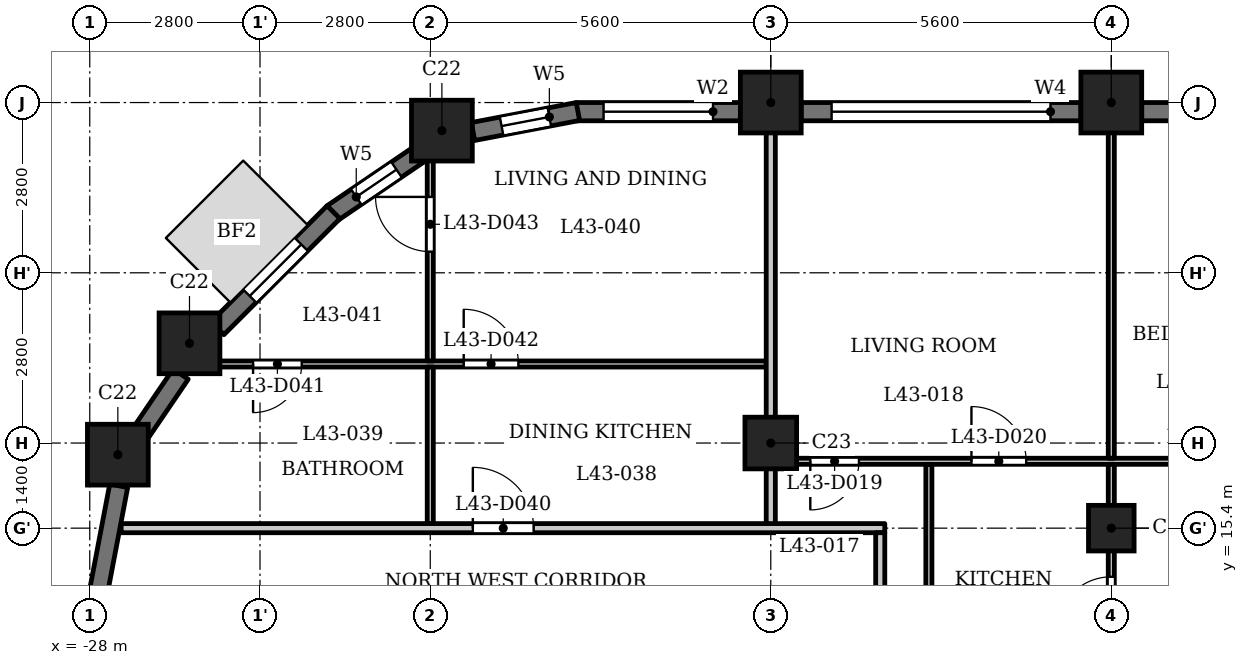
"""IFC4 building model, lengths in metres.
Left out: names, types, materials, properties, quantities, classifications, styles, units other than length and angle.
Written with IfcOpenShell. Run it as: python <this file> out.ifc"""

import sys

from ifc_helpers import new_model, si_unit, direction, frame, frame_2d, origin, origin_2d, place, context, subcontext, project, spatial, rectangle, extrude, element, fill, save


model = new_model("IFC4")
c1 = context("Model", 3, precision=1e-05, world=origin(), true_north=direction((0.0, 1.0)))
c2 = subcontext(c1, "Body", "Model", "MODEL_VIEW")
j1 = project(units=[si_unit("LENGTHUNIT", "METRE"), si_unit("PLANEANGLEUNIT", "RADIAN")], contexts=[c1])
p1 = place(None, origin())
s1 = spatial("IfcSite", under=j1, at=p1, CompositionType="ELEMENT")
p2 = place(p1, origin())
s2 = spatial("IfcBuilding", under=s1, at=p2, CompositionType="ELEMENT")
p3 = place(p2, frame((0.0, 0.0, 167.6)))
s3 = spatial("IfcBuildingStorey", under=s2, at=p3, CompositionType="ELEMENT", Elevation=167.6)
for number, where, z_axis, x_axis in (
    (1, (-11.2, 22.4, 0.0), (0.0, 0.0, 1.0), (1.0, 0.0, 0.0)),
    (2, (-16.8, 22.4, 0.0), (0.0, 0.0, 1.0), (1.0, 0.0, 0.0)),
    (3, (-22.209, 21.938, 0.0), (0.0, 0.0, 1.0), (1.0, 0.0, 0.0)),
    (4, (-26.36, 18.44, 0.0), (0.0, 0.0, 1.0), (1.0, 0.0, 0.0)),
    (5, (-27.538, 16.609, 0.0), (0.0, 0.0, 1.0), (1.0, 0.0, 0.0)),
):
    element("IfcColumn", number, at=place(p3, frame(where, z_axis=z_axis, x_axis=x_axis)), inside=s3, PredefinedType="COLUMN", context=c2, shape_type="SweptSolid", body=[
        extrude(rectangle(XDim=1.0, YDim=1.0, at=origin_2d()), origin(), (0.0, 0.0, 1.0), 3.5),
    ])
p4 = place(p3, frame((-16.8, 16.8, 0.0), z_axis=(0.0, 0.0, 1.0), x_axis=(1.0, 0.0, 0.0)))
e6 = element("IfcColumn", 6, at=p4, inside=s3, PredefinedType="COLUMN", context=c2, shape_type="SweptSolid", body=[
    extrude(rectangle(XDim=0.85, YDim=0.85, at=origin_2d()), origin(), (0.0, 0.0, 1.0), 3.5),
])
p5 = place(p3, frame((-11.2, 15.4, 0.0), z_axis=(0.0, 0.0, 1.0), x_axis=(1.0, 0.0, 0.0)))
e7 = element("IfcColumn", 7, at=p5, inside=s3, PredefinedType="COLUMN", context=c2, shape_type="SweptSolid", body=[
    extrude(rectangle(XDim=0.75, YDim=0.75, at=origin_2d()), origin(), (0.0, 0.0, 1.0), 3.5),
])
p6 = place(p3, frame((-6.1, 22.25, 0.0), z_axis=(0.0, 0.0, 1.0), x_axis=(-1.0, 0.0, 0.0)))
e8 = element("IfcWall", 8, at=p6, inside=s3, PredefinedType="SOLIDWALL", context=c2, shape_type="SweptSolid", body=[
    extrude(rectangle(XDim=4.6, YDim=0.3, at=frame_2d((2.3, 0.0))), origin(), (0.0, 0.0, 1.0), 2.45),
])
p7 = place(p6, frame((0.512, 0.0, 0.6)))
e9 = element("IfcOpeningElement", 9, at=p7, cuts=e8, PredefinedType="OPENING", context=c2, shape_type="SweptSolid", body=[
    extrude(rectangle(XDim=1.2, YDim=1.55, at=frame_2d((0.6, 0.775))), frame((0.0, 0.16, 0.0), z_axis=(0.0, -1.0, 0.0), x_axis=(1.0, 0.0, 0.0)), (0.0, 0.0, 1.0), 0.32),
])
p8 = place(p6, frame((2.887, 0.0, 0.6)))
e10 = element("IfcOpeningElement", 10, at=p8, cuts=e8, PredefinedType="OPENING", context=c2, shape_type="SweptSolid", body=[
    extrude(rectangle(XDim=1.2, YDim=1.55, at=frame_2d((0.6, 0.775))), frame((0.0, 0.16, 0.0), z_axis=(0.0, -1.0, 0.0), x_axis=(1.0, 0.0, 0.0)), (0.0, 0.0, 1.0), 0.32),
])
p9 = place(p3, frame((-11.7, 22.25, 0.0), z_axis=(0.0, 0.0, 1.0), x_axis=(-1.0, 0.0, 0.0)))
e11 = element("IfcWall", 11, at=p9, inside=s3, PredefinedType="SOLIDWALL", context=c2, shape_type="SweptSolid", body=[
    extrude(rectangle(XDim=4.6, YDim=0.3, at=frame_2d((2.3, 0.0))), origin(), (0.0, 0.0, 1.0), 2.45),
])
p10 = place(p9, frame((0.5, 0.0, 1.2)))
e12 = element("IfcOpeningElement", 12, at=p10, cuts=e11, PredefinedType="OPENING", context=c2, shape_type="SweptSolid", body=[
    extrude(rectangle(XDim=3.6, YDim=0.95, at=frame_2d((1.8, 0.475))), frame((0.0, 0.16, 0.0), z_axis=(0.0, -1.0, 0.0), x_axis=(1.0, 0.0, 0.0)), (0.0, 0.0, 1.0), 0.32),
])
p11 = place(p3, frame((-17.3, 22.25, 0.0), z_axis=(0.0, 0.0, 1.0), x_axis=(-1.0, 0.0, 0.0)))
e13 = element("IfcWall", 13, at=p11, inside=s3, PredefinedType="SOLIDWALL", context=c2, shape_type="SweptSolid", body=[
    extrude(rectangle(XDim=2.7, YDim=0.3, at=frame_2d((1.35, 0.0))), origin(), (0.0, 0.0, 1.0), 2.45),
])
p12 = place(p11, frame((0.45, 0.0, 0.9)))
e14 = element("IfcOpeningElement", 14, at=p12, cuts=e13, PredefinedType="OPENING", context=c2, shape_type="SweptSolid", body=[
    extrude(rectangle(XDim=1.8, YDim=1.25, at=frame_2d((0.9, 0.625))), frame((0.0, 0.16, 0.0), z_axis=(0.0, -1.0, 0.0), x_axis=(1.0, 0.0, 0.0)), (0.0, 0.0, 1.0), 0.32),
])
p13 = place(p3, frame((-19.972, 22.253, 0.0), z_axis=(0.0, 0.0, 1.0), x_axis=(-0.982284988433, -0.187393173565, 0.0)))
e15 = element("IfcWall", 15, at=p13, inside=s3, PredefinedType="SOLIDWALL", context=c2, shape_type="SweptSolid", body=[
    extrude(rectangle(XDim=1.756, YDim=0.3, at=frame_2d((0.878, 0.0))), origin(), (0.0, 0.0, 1.0), 2.45),
])
p14 = place(p13, frame((0.478, 0.0, 0.6)))
e16 = element("IfcOpeningElement", 16, at=p14, cuts=e15, PredefinedType="OPENING", context=c2, shape_type="SweptSolid", body=[
    extrude(rectangle(XDim=0.8, YDim=1.55, at=frame_2d((0.4, 0.775))), frame((0.0, 0.16, 0.0), z_axis=(0.0, -1.0, 0.0), x_axis=(1.0, 0.0, 0.0)), (0.0, 0.0, 1.0), 0.32),
])
p15 = place(p3, frame((-22.56, 21.566, 0.0), z_axis=(0.0, 0.0, 1.0), x_axis=(-0.82707645233, -0.562089443061, 0.0)))
e17 = element("IfcWall", 17, at=p15, inside=s3, PredefinedType="SOLIDWALL", context=c2, shape_type="SweptSolid", body=[
    extrude(rectangle(XDim=1.756, YDim=0.3, at=frame_2d((0.878, 0.0))), origin(), (0.0, 0.0, 1.0), 2.45),
])
p16 = place(p15, frame((0.478, 0.0, 0.6)))
e18 = element("IfcOpeningElement", 18, at=p16, cuts=e17, PredefinedType="OPENING", context=c2, shape_type="SweptSolid", body=[
    extrude(rectangle(XDim=0.8, YDim=1.55, at=frame_2d((0.4, 0.775))), frame((0.0, 0.16, 0.0), z_axis=(0.0, -1.0, 0.0), x_axis=(1.0, 0.0, 0.0)), (0.0, 0.0, 1.0), 0.32),
])
p17 = place(p3, frame((-23.991, 20.597, 0.0), z_axis=(0.0, 0.0, 1.0), x_axis=(-0.707106781187, -0.707106781187, 0.0)))
e19 = element("IfcWall", 19, at=p17, inside=s3, PredefinedType="SOLIDWALL", context=c2, shape_type="SweptSolid", body=[
    extrude(rectangle(XDim=2.7, YDim=0.3, at=frame_2d((1.35, 0.0))), origin(), (0.0, 0.0, 1.0), 2.45),
])
p18 = place(p17, frame((0.75, 0.0, 0.6)))
e20 = element("IfcOpeningElement", 20, at=p18, cuts=e19, PredefinedType="OPENING", context=c2, shape_type="SweptSolid", body=[
    extrude(rectangle(XDim=1.2, YDim=1.55, at=frame_2d((0.6, 0.775))), frame((0.0, 0.16, 0.0), z_axis=(0.0, -1.0, 0.0), x_axis=(1.0, 0.0, 0.0)), (0.0, 0.0, 1.0), 0.32),
])
p19 = place(p3, frame((-26.504, 17.934, 0.0), z_axis=(0.0, 0.0, 1.0), x_axis=(-0.562145470373, -0.827038372833, 0.0)))
e21 = element("IfcWall", 21, at=p19, inside=s3, PredefinedType="SOLIDWALL", context=c2, shape_type="SweptSolid", body=[
    extrude(rectangle(XDim=1.177, YDim=0.3, at=frame_2d((0.588, 0.0))), origin(), (0.0, 0.0, 1.0), 3.2),
])
p20 = place(p3, frame((-27.524, 16.097, 0.0), z_axis=(0.0, 0.0, 1.0), x_axis=(-0.187259034321, -0.982310569049, 0.0)))
e22 = element("IfcWall", 22, at=p20, inside=s3, PredefinedType="SOLIDWALL", context=c2, shape_type="SweptSolid", body=[
    extrude(rectangle(XDim=1.756, YDim=0.3, at=frame_2d((0.878, 0.0))), origin(), (0.0, 0.0, 1.0), 2.45),
])
p21 = place(p3, frame((-27.484, 15.4, 0.0), z_axis=(0.0, 0.0, 1.0), x_axis=(1.0, 0.0, 0.0)))
e23 = element("IfcWall", 23, at=p21, inside=s3, PredefinedType="PARTITIONING", context=c2, shape_type="SweptSolid", body=[
    extrude(rectangle(XDim=12.559, YDim=0.15, at=frame_2d((6.279, 0.0))), origin(), (0.0, 0.0, 1.0), 3.2),
])
p22 = place(p21, frame((5.784, 0.0, 0.0)))
e24 = element("IfcOpeningElement", 24, at=p22, cuts=e23, PredefinedType="OPENING", context=c2, shape_type="SweptSolid", body=[
    extrude(rectangle(XDim=1.0, YDim=2.1, at=frame_2d((0.5, 1.05))), frame((0.0, 0.085, 0.0), z_axis=(0.0, -1.0, 0.0), x_axis=(1.0, 0.0, 0.0)), (0.0, 0.0, 1.0), 0.17),
])
p23 = place(p3, frame((-16.725, 16.5, 0.0), z_axis=(0.0, 0.0, 1.0), x_axis=(1.0, 0.0, 0.0)))
e25 = element("IfcWall", 25, at=p23, inside=s3, PredefinedType="PARTITIONING", context=c2, shape_type="SweptSolid", body=[
    extrude(rectangle(XDim=33.45, YDim=0.1, at=frame_2d((16.725, 0.0))), origin(), (0.0, 0.0, 1.0), 3.2),
])
p24 = place(p23, frame((0.575, 0.0, 0.0)))
e26 = element("IfcOpeningElement", 26, at=p24, cuts=e25, PredefinedType="OPENING", context=c2, shape_type="SweptSolid", body=[
    extrude(rectangle(XDim=0.8, YDim=2.1, at=frame_2d((0.4, 1.05))), frame((0.0, 0.06, 0.0), z_axis=(0.0, -1.0, 0.0), x_axis=(1.0, 0.0, 0.0)), (0.0, 0.0, 1.0), 0.12),
])
p25 = place(p23, frame((3.225, 0.0, 0.0)))
e27 = element("IfcOpeningElement", 27, at=p25, cuts=e25, PredefinedType="OPENING", context=c2, shape_type="SweptSolid", body=[
    extrude(rectangle(XDim=0.9, YDim=2.1, at=frame_2d((0.45, 1.05))), frame((0.0, 0.06, 0.0), z_axis=(0.0, -1.0, 0.0), x_axis=(1.0, 0.0, 0.0)), (0.0, 0.0, 1.0), 0.12),
])
p26 = place(p23, frame((6.775, 0.0, 0.0)))
e28 = element("IfcOpeningElement", 28, at=p26, cuts=e25, PredefinedType="OPENING", context=c2, shape_type="SweptSolid", body=[
    extrude(rectangle(XDim=0.9, YDim=2.1, at=frame_2d((0.45, 1.05))), frame((0.0, 0.06, 0.0), z_axis=(0.0, -1.0, 0.0), x_axis=(1.0, 0.0, 0.0)), (0.0, 0.0, 1.0), 0.12),
])
p27 = place(p23, frame((8.825, 0.0, 0.0)))
e29 = element("IfcOpeningElement", 29, at=p27, cuts=e25, PredefinedType="OPENING", context=c2, shape_type="SweptSolid", body=[
    extrude(rectangle(XDim=0.9, YDim=2.1, at=frame_2d((0.45, 1.05))), frame((0.0, 0.06, 0.0), z_axis=(0.0, -1.0, 0.0), x_axis=(1.0, 0.0, 0.0)), (0.0, 0.0, 1.0), 0.12),
])
p28 = place(p23, frame((20.775, 0.0, 0.0)))
e30 = element("IfcOpeningElement", 30, at=p28, cuts=e25, PredefinedType="OPENING", context=c2, shape_type="SweptSolid", body=[
    extrude(rectangle(XDim=0.8, YDim=2.1, at=frame_2d((0.4, 1.05))), frame((0.0, 0.06, 0.0), z_axis=(0.0, -1.0, 0.0), x_axis=(1.0, 0.0, 0.0)), (0.0, 0.0, 1.0), 0.12),
])
p29 = place(p23, frame((17.325, 0.0, 0.0)))
e31 = element("IfcOpeningElement", 31, at=p29, cuts=e25, PredefinedType="OPENING", context=c2, shape_type="SweptSolid", body=[
    extrude(rectangle(XDim=0.9, YDim=2.1, at=frame_2d((0.45, 1.05))), frame((0.0, 0.06, 0.0), z_axis=(0.0, -1.0, 0.0), x_axis=(1.0, 0.0, 0.0)), (0.0, 0.0, 1.0), 0.12),
])
p30 = place(p23, frame((12.375, 0.0, 0.0)))
e32 = element("IfcOpeningElement", 32, at=p30, cuts=e25, PredefinedType="OPENING", context=c2, shape_type="SweptSolid", body=[
    extrude(rectangle(XDim=0.9, YDim=2.1, at=frame_2d((0.45, 1.05))), frame((0.0, 0.06, 0.0), z_axis=(0.0, -1.0, 0.0), x_axis=(1.0, 0.0, 0.0)), (0.0, 0.0, 1.0), 0.12),
])
p31 = place(p23, frame((14.425, 0.0, 0.0)))
e33 = element("IfcOpeningElement", 33, at=p31, cuts=e25, PredefinedType="OPENING", context=c2, shape_type="SweptSolid", body=[
    extrude(rectangle(XDim=0.9, YDim=2.1, at=frame_2d((0.45, 1.05))), frame((0.0, 0.06, 0.0), z_axis=(0.0, -1.0, 0.0), x_axis=(1.0, 0.0, 0.0)), (0.0, 0.0, 1.0), 0.12),
])
p32 = place(p23, frame((26.575, 0.0, 0.0)))
e34 = element("IfcOpeningElement", 34, at=p32, cuts=e25, PredefinedType="OPENING", context=c2, shape_type="SweptSolid", body=[
    extrude(rectangle(XDim=0.8, YDim=2.1, at=frame_2d((0.4, 1.05))), frame((0.0, 0.06, 0.0), z_axis=(0.0, -1.0, 0.0), x_axis=(1.0, 0.0, 0.0)), (0.0, 0.0, 1.0), 0.12),
])
p33 = place(p23, frame((23.775, 0.0, 0.0)))
e35 = element("IfcOpeningElement", 35, at=p33, cuts=e25, PredefinedType="OPENING", context=c2, shape_type="SweptSolid", body=[
    extrude(rectangle(XDim=0.9, YDim=2.1, at=frame_2d((0.45, 1.05))), frame((0.0, 0.06, 0.0), z_axis=(0.0, -1.0, 0.0), x_axis=(1.0, 0.0, 0.0)), (0.0, 0.0, 1.0), 0.12),
])
p34 = place(p23, frame((32.075, 0.0, 0.0)))
e36 = element("IfcOpeningElement", 36, at=p34, cuts=e25, PredefinedType="OPENING", context=c2, shape_type="SweptSolid", body=[
    extrude(rectangle(XDim=0.8, YDim=2.1, at=frame_2d((0.4, 1.05))), frame((0.0, 0.06, 0.0), z_axis=(0.0, -1.0, 0.0), x_axis=(1.0, 0.0, 0.0)), (0.0, 0.0, 1.0), 0.12),
])
p35 = place(p23, frame((29.375, 0.0, 0.0)))
e37 = element("IfcOpeningElement", 37, at=p35, cuts=e25, PredefinedType="OPENING", context=c2, shape_type="SweptSolid", body=[
    extrude(rectangle(XDim=0.9, YDim=2.1, at=frame_2d((0.45, 1.05))), frame((0.0, 0.06, 0.0), z_axis=(0.0, -1.0, 0.0), x_axis=(1.0, 0.0, 0.0)), (0.0, 0.0, 1.0), 0.12),
])
p36 = place(p3, frame((-26.44, 18.1, 0.0), z_axis=(0.0, 0.0, 1.0), x_axis=(1.0, 0.0, 0.0)))
e38 = element("IfcWall", 38, at=p36, inside=s3, PredefinedType="PARTITIONING", context=c2, shape_type="SweptSolid", body=[
    extrude(rectangle(XDim=9.565, YDim=0.1, at=frame_2d((4.782, 0.0))), origin(), (0.0, 0.0, 1.0), 3.2),
])
p37 = place(p36, frame((1.126, 0.0, 0.0)))
e39 = element("IfcOpeningElement", 39, at=p37, cuts=e38, PredefinedType="OPENING", context=c2, shape_type="SweptSolid", body=[
    extrude(rectangle(XDim=0.8, YDim=2.1, at=frame_2d((0.4, 1.05))), frame((0.0, 0.06, 0.0), z_axis=(0.0, -1.0, 0.0), x_axis=(1.0, 0.0, 0.0)), (0.0, 0.0, 1.0), 0.12),
])
p38 = place(p36, frame((4.59, 0.0, 0.0)))
e40 = element("IfcOpeningElement", 40, at=p38, cuts=e38, PredefinedType="OPENING", context=c2, shape_type="SweptSolid", body=[
    extrude(rectangle(XDim=0.9, YDim=2.1, at=frame_2d((0.45, 1.05))), frame((0.0, 0.06, 0.0), z_axis=(0.0, -1.0, 0.0), x_axis=(1.0, 0.0, 0.0)), (0.0, 0.0, 1.0), 0.12),
])
p39 = place(p3, frame((-22.4, 15.475, 0.0), z_axis=(0.0, 0.0, 1.0), x_axis=(0.0, 1.0, 0.0)))
e41 = element("IfcWall", 41, at=p39, inside=s3, PredefinedType="PARTITIONING", context=c2, shape_type="SweptSolid", body=[
    extrude(rectangle(XDim=2.575, YDim=0.1, at=frame_2d((1.288, 0.0))), origin(), (0.0, 0.0, 1.0), 3.2),
])
p40 = place(p3, frame((-22.4, 18.15, 0.0), z_axis=(0.0, 0.0, 1.0), x_axis=(0.0, 1.0, 0.0)))
e42 = element("IfcWall", 42, at=p40, inside=s3, PredefinedType="PARTITIONING", context=c2, shape_type="SweptSolid", body=[
    extrude(rectangle(XDim=3.57, YDim=0.1, at=frame_2d((1.785, 0.0))), origin(), (0.0, 0.0, 1.0), 3.2),
])
p41 = place(p40, frame((1.798, 0.0, 0.0)))
e43 = element("IfcOpeningElement", 43, at=p41, cuts=e42, PredefinedType="OPENING", context=c2, shape_type="SweptSolid", body=[
    extrude(rectangle(XDim=0.9, YDim=2.1, at=frame_2d((0.45, 1.05))), frame((0.0, 0.06, 0.0), z_axis=(0.0, -1.0, 0.0), x_axis=(1.0, 0.0, 0.0)), (0.0, 0.0, 1.0), 0.12),
])
p42 = place(p3, frame((-16.8, 15.475, 0.0), z_axis=(0.0, 0.0, 1.0), x_axis=(0.0, 1.0, 0.0)))
e44 = element("IfcWall", 44, at=p42, inside=s3, PredefinedType="PARTITIONING", context=c2, shape_type="SweptSolid", body=[
    extrude(rectangle(XDim=7.405, YDim=0.15, at=frame_2d((3.702, 0.0))), origin(), (0.0, 0.0, 1.0), 3.2),
])
p43 = place(p3, frame((-15.0, 13.275, 0.0), z_axis=(0.0, 0.0, 1.0), x_axis=(0.0, 1.0, 0.0)))
e45 = element("IfcWall", 45, at=p43, inside=s3, PredefinedType="PARTITIONING", context=c2, shape_type="SweptSolid", body=[
    extrude(rectangle(XDim=2.05, YDim=0.15, at=frame_2d((1.025, 0.0))), origin(), (0.0, 0.0, 1.0), 3.2),
])
p44 = place(p3, frame((-14.2, 13.275, 0.0), z_axis=(0.0, 0.0, 1.0), x_axis=(0.0, 1.0, 0.0)))
e46 = element("IfcWall", 46, at=p44, inside=s3, PredefinedType="PARTITIONING", context=c2, shape_type="SweptSolid", body=[
    extrude(rectangle(XDim=3.175, YDim=0.1, at=frame_2d((1.587, 0.0))), origin(), (0.0, 0.0, 1.0), 3.2),
])
p45 = place(p3, frame((-11.2, 13.275, 0.0), z_axis=(0.0, 0.0, 1.0), x_axis=(0.0, 1.0, 0.0)))
e47 = element("IfcWall", 47, at=p45, inside=s3, PredefinedType="PARTITIONING", context=c2, shape_type="SweptSolid", body=[
    extrude(rectangle(XDim=3.175, YDim=0.1, at=frame_2d((1.587, 0.0))), origin(), (0.0, 0.0, 1.0), 3.2),
])
p46 = place(p45, frame((0.425, 0.0, 0.0)))
e48 = element("IfcOpeningElement", 48, at=p46, cuts=e47, PredefinedType="OPENING", context=c2, shape_type="SweptSolid", body=[
    extrude(rectangle(XDim=0.9, YDim=2.1, at=frame_2d((0.45, 1.05))), frame((0.0, 0.06, 0.0), z_axis=(0.0, -1.0, 0.0), x_axis=(1.0, 0.0, 0.0)), (0.0, 0.0, 1.0), 0.12),
])
p47 = place(p3, frame((-11.2, 16.55, 0.0), z_axis=(0.0, 0.0, 1.0), x_axis=(0.0, 1.0, 0.0)))
e49 = element("IfcWall", 49, at=p47, inside=s3, PredefinedType="PARTITIONING", context=c2, shape_type="SweptSolid", body=[
    extrude(rectangle(XDim=6.33, YDim=0.1, at=frame_2d((3.165, 0.0))), origin(), (0.0, 0.0, 1.0), 3.2),
])
p48 = place(p46, origin())
e50 = element("IfcDoor", 50, at=p48, inside=s3, OperationType="SINGLE_SWING_RIGHT", PredefinedType="DOOR", context=c2, shape_type="SweptSolid", body=[
    extrude(rectangle(XDim=0.9, YDim=2.1, at=frame_2d((0.45, 1.05))), frame((0.0, 0.025, 0.0), z_axis=(0.0, -1.0, 0.0), x_axis=(1.0, 0.0, 0.0)), (0.0, 0.0, 1.0), 0.05),
])
fill(e48, e50)
p49 = place(p24, origin())
e51 = element("IfcDoor", 51, at=p49, inside=s3, OperationType="SINGLE_SWING_LEFT", PredefinedType="DOOR", context=c2, shape_type="SweptSolid", body=[
    extrude(rectangle(XDim=0.8, YDim=2.1, at=frame_2d((0.4, 1.05))), frame((0.0, 0.025, 0.0), z_axis=(0.0, -1.0, 0.0), x_axis=(1.0, 0.0, 0.0)), (0.0, 0.0, 1.0), 0.05),
])
fill(e26, e51)
p50 = place(p25, origin())
e52 = element("IfcDoor", 52, at=p50, inside=s3, OperationType="SINGLE_SWING_RIGHT", PredefinedType="DOOR", context=c2, shape_type="SweptSolid", body=[
    extrude(rectangle(XDim=0.9, YDim=2.1, at=frame_2d((0.45, 1.05))), frame((0.0, 0.025, 0.0), z_axis=(0.0, -1.0, 0.0), x_axis=(1.0, 0.0, 0.0)), (0.0, 0.0, 1.0), 0.05),
])
fill(e27, e52)
p51 = place(p22, origin())
e53 = element("IfcDoor", 53, at=p51, inside=s3, OperationType="SINGLE_SWING_RIGHT", PredefinedType="DOOR", context=c2, shape_type="SweptSolid", body=[
    extrude(rectangle(XDim=1.0, YDim=2.1, at=frame_2d((0.5, 1.05))), frame((0.0, 0.025, 0.0), z_axis=(0.0, -1.0, 0.0), x_axis=(1.0, 0.0, 0.0)), (0.0, 0.0, 1.0), 0.05),
])
fill(e24, e53)
p52 = place(p37, origin())
e54 = element("IfcDoor", 54, at=p52, inside=s3, OperationType="SINGLE_SWING_LEFT", PredefinedType="DOOR", context=c2, shape_type="SweptSolid", body=[
    extrude(rectangle(XDim=0.8, YDim=2.1, at=frame_2d((0.4, 1.05))), frame((0.0, 0.025, 0.0), z_axis=(0.0, -1.0, 0.0), x_axis=(1.0, 0.0, 0.0)), (0.0, 0.0, 1.0), 0.05),
])
fill(e39, e54)
p53 = place(p38, origin())
e55 = element("IfcDoor", 55, at=p53, inside=s3, OperationType="SINGLE_SWING_RIGHT", PredefinedType="DOOR", context=c2, shape_type="SweptSolid", body=[
    extrude(rectangle(XDim=0.9, YDim=2.1, at=frame_2d((0.45, 1.05))), frame((0.0, 0.025, 0.0), z_axis=(0.0, -1.0, 0.0), x_axis=(1.0, 0.0, 0.0)), (0.0, 0.0, 1.0), 0.05),
])
fill(e40, e55)
p54 = place(p41, origin())
e56 = element("IfcDoor", 56, at=p54, inside=s3, OperationType="SINGLE_SWING_LEFT", PredefinedType="DOOR", context=c2, shape_type="SweptSolid", body=[
    extrude(rectangle(XDim=0.9, YDim=2.1, at=frame_2d((0.45, 1.05))), frame((0.0, 0.025, 0.0), z_axis=(0.0, -1.0, 0.0), x_axis=(1.0, 0.0, 0.0)), (0.0, 0.0, 1.0), 0.05),
])
fill(e43, e56)
p55 = place(p10, origin())
e57 = element("IfcWindow", 57, at=p55, inside=s3, PartitioningType="SINGLE_PANEL", PredefinedType="WINDOW", context=c2, shape_type="SweptSolid", body=[
    extrude(rectangle(XDim=3.6, YDim=0.95, at=frame_2d((1.8, 0.475))), frame((0.0, 0.03, 0.0), z_axis=(0.0, -1.0, 0.0), x_axis=(1.0, 0.0, 0.0)), (0.0, 0.0, 1.0), 0.06),
])
fill(e12, e57)
p56 = place(p12, origin())
e58 = element("IfcWindow", 58, at=p56, inside=s3, PartitioningType="SINGLE_PANEL", PredefinedType="WINDOW", context=c2, shape_type="SweptSolid", body=[
    extrude(rectangle(XDim=1.8, YDim=1.25, at=frame_2d((0.9, 0.625))), frame((0.0, 0.03, 0.0), z_axis=(0.0, -1.0, 0.0), x_axis=(1.0, 0.0, 0.0)), (0.0, 0.0, 1.0), 0.06),
])
fill(e14, e58)
p57 = place(p14, origin())
e59 = element("IfcWindow", 59, at=p57, inside=s3, PartitioningType="SINGLE_PANEL", PredefinedType="WINDOW", context=c2, shape_type="SweptSolid", body=[
    extrude(rectangle(XDim=0.8, YDim=1.55, at=frame_2d((0.4, 0.775))), frame((0.0, 0.03, 0.0), z_axis=(0.0, -1.0, 0.0), x_axis=(1.0, 0.0, 0.0)), (0.0, 0.0, 1.0), 0.06),
])
fill(e16, e59)
p58 = place(p16, origin())
e60 = element("IfcWindow", 60, at=p58, inside=s3, PartitioningType="SINGLE_PANEL", PredefinedType="WINDOW", context=c2, shape_type="SweptSolid", body=[
    extrude(rectangle(XDim=0.8, YDim=1.55, at=frame_2d((0.4, 0.775))), frame((0.0, 0.03, 0.0), z_axis=(0.0, -1.0, 0.0), x_axis=(1.0, 0.0, 0.0)), (0.0, 0.0, 1.0), 0.06),
])
fill(e18, e60)
p59 = place(p18, origin())
e61 = element("IfcWindow", 61, at=p59, inside=s3, PartitioningType="SINGLE_PANEL", PredefinedType="WINDOW", context=c2, shape_type="SweptSolid", body=[
    extrude(rectangle(XDim=1.2, YDim=1.55, at=frame_2d((0.6, 0.775))), frame((0.0, 0.03, 0.0), z_axis=(0.0, -1.0, 0.0), x_axis=(1.0, 0.0, 0.0)), (0.0, 0.0, 1.0), 0.06),
])
fill(e20, e61)
save(model, sys.argv[1])
